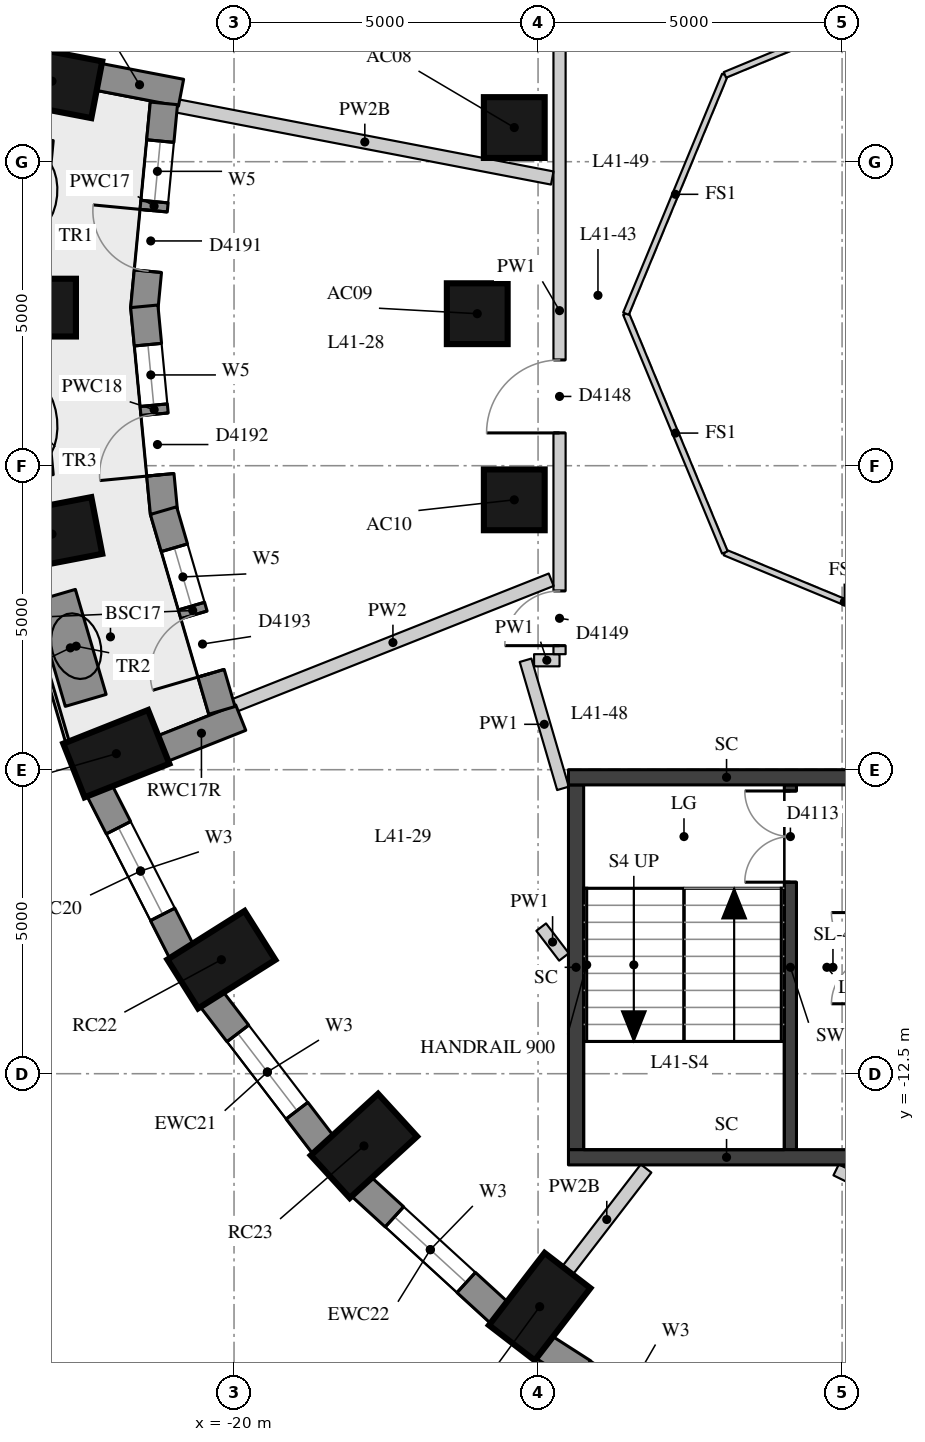
"""IFC4 building model, lengths in metres.
Left out: names, types, materials, properties, quantities, classifications, styles, units other than length and angle.
Written with IfcOpenShell. Run it as: python <this file> out.ifc"""

import sys

from ifc_helpers import new_model, si_unit, direction, frame, frame_2d, origin, origin_2d, place, context, subcontext, project, spatial, rectangle, extrude, element, fill, save


model = new_model("IFC4")
c1 = context("Model", 3, precision=1e-05, world=origin(), true_north=direction((0.0, 1.0)))
c2 = subcontext(c1, "Body", "Model", "MODEL_VIEW")
j1 = project(units=[si_unit("LENGTHUNIT", "METRE"), si_unit("PLANEANGLEUNIT", "RADIAN")], contexts=[c1])
p1 = place(None, origin())
s1 = spatial("IfcSite", under=j1, at=p1, CompositionType="ELEMENT")
p2 = place(p1, origin())
s2 = spatial("IfcBuilding", under=s1, at=p2, CompositionType="ELEMENT")
p3 = place(p2, frame((0.0, 0.0, 148.4)))
s3 = spatial("IfcBuildingStorey", under=s2, at=p3, CompositionType="ELEMENT", Elevation=148.4)
for number, where, z_axis, x_axis in (
    (1, (-22.994, 3.825, 0.0), (0.0, 0.0, 1.0), (-0.982, 0.189, 0.0)),
    (2, (-23.35, 0.1, 0.0), (0.0, 0.0, 1.0), (-1.0, 0.0, 0.0)),
    (3, (-22.994, -3.625, 0.0), (0.0, 0.0, 1.0), (-0.982, -0.189, 0.0)),
    (4, (-21.936, -7.236, 0.0), (0.0, 0.0, 1.0), (-0.93, -0.369, 0.0)),
    (5, (-20.208, -10.625, 0.0), (0.0, 0.0, 1.0), (-0.846, -0.533, 0.0)),
    (6, (-17.864, -13.688, 0.0), (0.0, 0.0, 1.0), (-0.738, -0.675, 0.0)),
    (7, (-14.973, -16.332, 0.0), (0.0, 0.0, 1.0), (-0.61, -0.792, 0.0)),
):
    element("IfcColumn", number, at=place(p3, frame(where, z_axis=z_axis, x_axis=x_axis)), inside=s3, PredefinedType="COLUMN", context=c2, shape_type="SweptSolid", body=[
        extrude(rectangle(XDim=1.5, YDim=0.95, at=origin_2d()), origin(), (0.0, 0.0, 1.0), 3.3),
    ])
for number, where, z_axis, x_axis in (
    (8, (-15.391, 3.062, 0.0), (0.0, 0.0, 1.0), (1.0, 0.0, 0.0)),
    (9, (-16.0, 0.0, 0.0), (0.0, 0.0, 1.0), (1.0, 0.0, 0.0)),
    (10, (-15.391, -3.062, 0.0), (0.0, 0.0, 1.0), (1.0, 0.0, 0.0)),
):
    element("IfcColumn", number, at=place(p3, frame(where, z_axis=z_axis, x_axis=x_axis)), inside=s3, PredefinedType="COLUMN", context=c2, shape_type="SweptSolid", body=[
        extrude(rectangle(XDim=1.0, YDim=1.0, at=origin_2d()), origin(), (0.0, 0.0, 1.0), 3.3),
    ])
p4 = place(p3, frame((-22.551, 7.191, 0.0), z_axis=(0.0, 0.0, 1.0), x_axis=(-0.281125768296, -0.959670934435, 0.0)))
e11 = element("IfcWall", 11, at=p4, inside=s3, PredefinedType="SOLIDWALL", context=c2, shape_type="SweptSolid", body=[
    extrude(rectangle(XDim=2.948, YDim=0.45, at=frame_2d((1.474, 0.0))), origin(), (0.0, 0.0, 1.0), 3.02),
])
p5 = place(p4, frame((0.674, 0.0, 0.4)))
e12 = element("IfcOpeningElement", 12, at=p5, cuts=e11, PredefinedType="OPENING", context=c2, shape_type="SweptSolid", body=[
    extrude(rectangle(XDim=1.6, YDim=1.75, at=frame_2d((0.8, 0.875))), frame((0.0, 0.235, 0.0), z_axis=(0.0, -1.0, 0.0), x_axis=(1.0, 0.0, 0.0)), (0.0, 0.0, 1.0), 0.47),
])
p6 = place(p3, frame((-22.215, -7.837, 0.0), z_axis=(0.0, 0.0, 1.0), x_axis=(0.454133999889, -0.890933392653, 0.0)))
e13 = element("IfcWall", 13, at=p6, inside=s3, PredefinedType="SOLIDWALL", context=c2, shape_type="SweptSolid", body=[
    extrude(rectangle(XDim=2.986, YDim=0.45, at=frame_2d((1.493, 0.0))), origin(), (0.0, 0.0, 1.0), 3.02),
])
p7 = place(p6, frame((0.693, 0.0, 0.4)))
e14 = element("IfcOpeningElement", 14, at=p7, cuts=e13, PredefinedType="OPENING", context=c2, shape_type="SweptSolid", body=[
    extrude(rectangle(XDim=1.6, YDim=1.75, at=frame_2d((0.8, 0.875))), frame((0.0, 0.235, 0.0), z_axis=(0.0, -1.0, 0.0), x_axis=(1.0, 0.0, 0.0)), (0.0, 0.0, 1.0), 0.47),
])
p8 = place(p3, frame((-20.374, -11.267, 0.0), z_axis=(0.0, 0.0, 1.0), x_axis=(0.607817056371, -0.794077090706, 0.0)))
e15 = element("IfcWall", 15, at=p8, inside=s3, PredefinedType="SOLIDWALL", context=c2, shape_type="SweptSolid", body=[
    extrude(rectangle(XDim=3.037, YDim=0.45, at=frame_2d((1.519, 0.0))), origin(), (0.0, 0.0, 1.0), 3.02),
])
p9 = place(p8, frame((0.719, 0.0, 0.4)))
e16 = element("IfcOpeningElement", 16, at=p9, cuts=e15, PredefinedType="OPENING", context=c2, shape_type="SweptSolid", body=[
    extrude(rectangle(XDim=1.6, YDim=1.75, at=frame_2d((0.8, 0.875))), frame((0.0, 0.235, 0.0), z_axis=(0.0, -1.0, 0.0), x_axis=(1.0, 0.0, 0.0)), (0.0, 0.0, 1.0), 0.47),
])
p10 = place(p3, frame((-17.913, -14.35, 0.0), z_axis=(0.0, 0.0, 1.0), x_axis=(0.737808755941, -0.675009807082, 0.0)))
e17 = element("IfcWall", 17, at=p10, inside=s3, PredefinedType="SOLIDWALL", context=c2, shape_type="SweptSolid", body=[
    extrude(rectangle(XDim=3.094, YDim=0.45, at=frame_2d((1.547, 0.0))), origin(), (0.0, 0.0, 1.0), 3.02),
])
p11 = place(p10, frame((0.747, 0.0, 0.4)))
e18 = element("IfcOpeningElement", 18, at=p11, cuts=e17, PredefinedType="OPENING", context=c2, shape_type="SweptSolid", body=[
    extrude(rectangle(XDim=1.6, YDim=1.75, at=frame_2d((0.8, 0.875))), frame((0.0, 0.235, 0.0), z_axis=(0.0, -1.0, 0.0), x_axis=(1.0, 0.0, 0.0)), (0.0, 0.0, 1.0), 0.47),
])
p12 = place(p3, frame((-14.908, -16.993, 0.0), z_axis=(0.0, 0.0, 1.0), x_axis=(0.842065914439, -0.539374633943, 0.0)))
e19 = element("IfcWall", 19, at=p12, inside=s3, PredefinedType="SOLIDWALL", context=c2, shape_type="SweptSolid", body=[
    extrude(rectangle(XDim=3.151, YDim=0.45, at=frame_2d((1.576, 0.0))), origin(), (0.0, 0.0, 1.0), 3.02),
])
p13 = place(p12, frame((0.776, 0.0, 0.4)))
e20 = element("IfcOpeningElement", 20, at=p13, cuts=e19, PredefinedType="OPENING", context=c2, shape_type="SweptSolid", body=[
    extrude(rectangle(XDim=1.6, YDim=1.75, at=frame_2d((0.8, 0.875))), frame((0.0, 0.235, 0.0), z_axis=(0.0, -1.0, 0.0), x_axis=(1.0, 0.0, 0.0)), (0.0, 0.0, 1.0), 0.47),
])
p14 = place(p3, frame((-22.237, 3.896, 0.0), z_axis=(0.0, 0.0, 1.0), x_axis=(0.98204526411, -0.188645432598, 0.0)))
e21 = element("IfcWall", 21, at=p14, inside=s3, PredefinedType="SOLIDWALL", context=c2, shape_type="SweptSolid", body=[
    extrude(rectangle(XDim=1.39, YDim=0.45, at=frame_2d((0.695, 0.0))), origin(), (0.0, 0.0, 1.0), 2.57),
])
p15 = place(p3, frame((-21.182, -7.156, 0.0), z_axis=(0.0, 0.0, 1.0), x_axis=(0.929514600716, 0.368785312961, 0.0)))
e22 = element("IfcWall", 22, at=p15, inside=s3, PredefinedType="SOLIDWALL", context=c2, shape_type="SweptSolid", body=[
    extrude(rectangle(XDim=1.39, YDim=0.45, at=frame_2d((0.695, 0.0))), origin(), (0.0, 0.0, 1.0), 3.02),
])
p16 = place(p3, frame((-21.154, 3.459, 0.0), z_axis=(0.0, 0.0, 1.0), x_axis=(-0.094968544931, -0.995480273774, 0.0)))
e23 = element("IfcWall", 23, at=p16, inside=s3, PredefinedType="SOLIDWALL", context=c2, shape_type="SweptSolid", body=[
    extrude(rectangle(XDim=3.396, YDim=0.45, at=frame_2d((1.698, 0.0))), origin(), (0.0, 0.0, 1.0), 3.02),
])
p17 = place(p16, frame((0.623, 0.0, 0.4)))
e24 = element("IfcOpeningElement", 24, at=p17, cuts=e23, PredefinedType="OPENING", context=c2, shape_type="SweptSolid", body=[
    extrude(rectangle(XDim=1.0, YDim=1.75, at=frame_2d((0.5, 0.875))), frame((0.0, 0.235, 0.0), z_axis=(0.0, -1.0, 0.0), x_axis=(1.0, 0.0, 0.0)), (0.0, 0.0, 1.0), 0.47),
])
p18 = place(p16, frame((1.773, 0.0, 0.0)))
e25 = element("IfcOpeningElement", 25, at=p18, cuts=e23, PredefinedType="OPENING", context=c2, shape_type="SweptSolid", body=[
    extrude(rectangle(XDim=1.0, YDim=2.15, at=frame_2d((0.5, 1.075))), frame((0.0, 0.235, 0.0), z_axis=(0.0, -1.0, 0.0), x_axis=(1.0, 0.0, 0.0)), (0.0, 0.0, 1.0), 0.47),
])
p19 = place(p3, frame((-21.476, 0.121, 0.0), z_axis=(0.0, 0.0, 1.0), x_axis=(0.094947321258, -0.995482298279, 0.0)))
e26 = element("IfcWall", 26, at=p19, inside=s3, PredefinedType="SOLIDWALL", context=c2, shape_type="SweptSolid", body=[
    extrude(rectangle(XDim=3.417, YDim=0.45, at=frame_2d((1.708, 0.0))), origin(), (0.0, 0.0, 1.0), 3.02),
])
p20 = place(p19, frame((0.634, 0.0, 0.4)))
e27 = element("IfcOpeningElement", 27, at=p20, cuts=e26, PredefinedType="OPENING", context=c2, shape_type="SweptSolid", body=[
    extrude(rectangle(XDim=1.0, YDim=1.75, at=frame_2d((0.5, 0.875))), frame((0.0, 0.235, 0.0), z_axis=(0.0, -1.0, 0.0), x_axis=(1.0, 0.0, 0.0)), (0.0, 0.0, 1.0), 0.47),
])
p21 = place(p19, frame((1.784, 0.0, 0.0)))
e28 = element("IfcOpeningElement", 28, at=p21, cuts=e26, PredefinedType="OPENING", context=c2, shape_type="SweptSolid", body=[
    extrude(rectangle(XDim=1.0, YDim=2.15, at=frame_2d((0.5, 1.075))), frame((0.0, 0.235, 0.0), z_axis=(0.0, -1.0, 0.0), x_axis=(1.0, 0.0, 0.0)), (0.0, 0.0, 1.0), 0.47),
])
p22 = place(p3, frame((-21.159, -3.239, 0.0), z_axis=(0.0, 0.0, 1.0), x_axis=(0.280377942886, -0.959889685924, 0.0)))
e29 = element("IfcWall", 29, at=p22, inside=s3, PredefinedType="SOLIDWALL", context=c2, shape_type="SweptSolid", body=[
    extrude(rectangle(XDim=3.423, YDim=0.45, at=frame_2d((1.711, 0.0))), origin(), (0.0, 0.0, 1.0), 3.02),
])
p23 = place(p22, frame((0.636, 0.0, 0.4)))
e30 = element("IfcOpeningElement", 30, at=p23, cuts=e29, PredefinedType="OPENING", context=c2, shape_type="SweptSolid", body=[
    extrude(rectangle(XDim=1.0, YDim=1.75, at=frame_2d((0.5, 0.875))), frame((0.0, 0.235, 0.0), z_axis=(0.0, -1.0, 0.0), x_axis=(1.0, 0.0, 0.0)), (0.0, 0.0, 1.0), 0.47),
])
p24 = place(p22, frame((1.786, 0.0, 0.0)))
e31 = element("IfcOpeningElement", 31, at=p24, cuts=e29, PredefinedType="OPENING", context=c2, shape_type="SweptSolid", body=[
    extrude(rectangle(XDim=1.0, YDim=2.15, at=frame_2d((0.5, 1.075))), frame((0.0, 0.235, 0.0), z_axis=(0.0, -1.0, 0.0), x_axis=(1.0, 0.0, 0.0)), (0.0, 0.0, 1.0), 0.47),
])
for number, where, z_axis, x_axis in (
    (32, (-23.322, 2.881, 0.0), (0.0, 0.0, 1.0), (-0.095, -0.995, 0.0)),
    (33, (-23.493, -0.889, 0.0), (0.0, 0.0, 1.0), (0.095, -0.995, 0.0)),
    (34, (-22.945, -4.633, 0.0), (0.0, 0.0, 1.0), (0.281, -0.96, 0.0)),
):
    element("IfcWall", number, at=place(p3, frame(where, z_axis=z_axis, x_axis=x_axis)), inside=s3, PredefinedType="USERDEFINED", context=c2, shape_type="SweptSolid", body=[
        extrude(rectangle(XDim=1.8, YDim=0.7, at=frame_2d((0.9, 0.0))), origin(), (0.0, 0.0, 1.0), 0.75),
    ])
p25 = place(p3, frame((-10.85, -13.75, 0.0), z_axis=(0.0, 0.0, 1.0), x_axis=(0.0, 1.0, 0.0)))
e35 = element("IfcWall", 35, at=p25, inside=s3, PredefinedType="SHEAR", context=c2, shape_type="SweptSolid", body=[
    extrude(rectangle(XDim=6.0, YDim=0.2, at=frame_2d((3.0, 0.0))), origin(), (0.0, 0.0, 1.0), 3.02),
])
p26 = place(p25, frame((4.4, 0.0, 0.0)))
e36 = element("IfcOpeningElement", 36, at=p26, cuts=e35, PredefinedType="OPENING", context=c2, shape_type="SweptSolid", body=[
    extrude(rectangle(XDim=1.5, YDim=2.1, at=frame_2d((0.75, 1.05))), frame((0.0, 0.11, 0.0), z_axis=(0.0, -1.0, 0.0), x_axis=(1.0, 0.0, 0.0)), (0.0, 0.0, 1.0), 0.22),
])
p27 = place(p3, frame((-14.375, -13.75, -0.28), z_axis=(0.0, 0.0, 1.0), x_axis=(0.0, 1.0, 0.0)))
e37 = element("IfcWall", 37, at=p27, inside=s3, PredefinedType="SHEAR", context=c2, shape_type="SweptSolid", body=[
    extrude(rectangle(XDim=6.0, YDim=0.25, at=frame_2d((3.0, 0.0))), origin(), (0.0, 0.0, 1.0), 3.3),
])
for number, where, z_axis, x_axis in (
    (38, (-14.5, -7.625, -0.28), (0.0, 0.0, 1.0), (1.0, 0.0, 0.0)),
    (39, (-14.5, -13.875, -0.28), (0.0, 0.0, 1.0), (1.0, 0.0, 0.0)),
):
    element("IfcWall", number, at=place(p3, frame(where, z_axis=z_axis, x_axis=x_axis)), inside=s3, PredefinedType="SHEAR", context=c2, shape_type="SweptSolid", body=[
        extrude(rectangle(XDim=5.2, YDim=0.25, at=frame_2d((2.6, 0.0))), origin(), (0.0, 0.0, 1.0), 3.3),
    ])
p28 = place(p3, frame((-7.844, -15.185, 0.0), z_axis=(0.0, 0.0, 1.0), x_axis=(-0.898266579534, 0.439450966653, 0.0)))
e40 = element("IfcWall", 40, at=p28, inside=s3, PredefinedType="PARTITIONING", context=c2, shape_type="SweptSolid", body=[
    extrude(rectangle(XDim=2.509, YDim=0.2, at=frame_2d((1.254, 0.0))), origin(), (0.0, 0.0, 1.0), 3.02),
])
p29 = place(p3, frame((-14.574, -10.58, 0.0), z_axis=(0.0, 0.0, 1.0), x_axis=(-0.606745625174, 0.794896060081, 0.0)))
e41 = element("IfcWall", 41, at=p29, inside=s3, PredefinedType="PARTITIONING", context=c2, shape_type="SweptSolid", body=[
    extrude(rectangle(XDim=0.618, YDim=0.2, at=frame_2d((0.309, 0.0))), origin(), (0.0, 0.0, 1.0), 3.02),
])
p30 = place(p3, frame((-14.59, -7.807, 0.0), z_axis=(0.0, 0.0, 1.0), x_axis=(-0.280401457903, 0.959882817018, 0.0)))
e42 = element("IfcWall", 42, at=p30, inside=s3, PredefinedType="PARTITIONING", context=c2, shape_type="SweptSolid", body=[
    extrude(rectangle(XDim=2.195, YDim=0.2, at=frame_2d((1.098, 0.0))), origin(), (0.0, 0.0, 1.0), 3.02),
])
p31 = place(p3, frame((-15.065, -5.7, 0.0), z_axis=(0.0, 0.0, 1.0), x_axis=(1.0, 0.0, 0.0)))
e43 = element("IfcWall", 43, at=p31, inside=s3, PredefinedType="PARTITIONING", context=c2, shape_type="SweptSolid", body=[
    extrude(rectangle(XDim=0.419, YDim=0.2, at=frame_2d((0.209, 0.0))), origin(), (0.0, 0.0, 1.0), 3.02),
])
p32 = place(p3, frame((-14.647, -5.6, 0.0), z_axis=(0.0, 0.0, 1.0), x_axis=(0.0, 1.0, 0.0)))
e44 = element("IfcWall", 44, at=p32, inside=s3, PredefinedType="PARTITIONING", context=c2, shape_type="SweptSolid", body=[
    extrude(rectangle(XDim=11.3, YDim=0.2, at=frame_2d((5.65, 0.0))), origin(), (0.0, 0.0, 1.0), 3.02),
])
p33 = place(p32, frame((10.06, 0.0, 0.0)))
e45 = element("IfcOpeningElement", 45, at=p33, cuts=e44, PredefinedType="OPENING", context=c2, shape_type="SweptSolid", body=[
    extrude(rectangle(XDim=1.1, YDim=2.1, at=frame_2d((0.55, 1.05))), frame((0.0, 0.11, 0.0), z_axis=(0.0, -1.0, 0.0), x_axis=(1.0, 0.0, 0.0)), (0.0, 0.0, 1.0), 0.22),
])
p34 = place(p32, frame((3.639, 0.0, 0.0)))
e46 = element("IfcOpeningElement", 46, at=p34, cuts=e44, PredefinedType="OPENING", context=c2, shape_type="SweptSolid", body=[
    extrude(rectangle(XDim=1.2, YDim=2.1, at=frame_2d((0.6, 1.05))), frame((0.0, 0.11, 0.0), z_axis=(0.0, -1.0, 0.0), x_axis=(1.0, 0.0, 0.0)), (0.0, 0.0, 1.0), 0.22),
])
p35 = place(p32, frame((0.14, 0.0, 0.0)))
e47 = element("IfcOpeningElement", 47, at=p35, cuts=e44, PredefinedType="OPENING", context=c2, shape_type="SweptSolid", body=[
    extrude(rectangle(XDim=0.9, YDim=2.1, at=frame_2d((0.45, 1.05))), frame((0.0, 0.11, 0.0), z_axis=(0.0, -1.0, 0.0), x_axis=(1.0, 0.0, 0.0)), (0.0, 0.0, 1.0), 0.22),
])
p36 = place(p3, frame((-20.932, 3.417, 0.0), z_axis=(0.0, 0.0, 1.0), x_axis=(0.982023362662, -0.188759410856, 0.0)))
e48 = element("IfcWall", 48, at=p36, inside=s3, PredefinedType="PARTITIONING", context=c2, shape_type="SweptSolid", body=[
    extrude(rectangle(XDim=6.278, YDim=0.22, at=frame_2d((3.139, 0.0))), origin(), (0.0, 0.0, 1.0), 2.57),
])
p37 = place(p3, frame((-19.99, -6.441, 0.0), z_axis=(0.0, 0.0, 1.0), x_axis=(0.929507316491, 0.368803672147, 0.0)))
e49 = element("IfcWall", 49, at=p37, inside=s3, PredefinedType="PARTITIONING", context=c2, shape_type="SweptSolid", body=[
    extrude(rectangle(XDim=5.6, YDim=0.22, at=frame_2d((2.8, 0.0))), origin(), (0.0, 0.0, 1.0), 3.02),
])
p38 = place(p3, frame((-14.516, -15.737, 0.0), z_axis=(0.0, 0.0, 1.0), x_axis=(0.609983624648, 0.792414019097, 0.0)))
e50 = element("IfcWall", 50, at=p38, inside=s3, PredefinedType="PARTITIONING", context=c2, shape_type="SweptSolid", body=[
    extrude(rectangle(XDim=2.118, YDim=0.22, at=frame_2d((1.059, 0.0))), origin(), (0.0, 0.0, 1.0), 2.57),
])
for number, where, z_axis, x_axis in (
    (51, (-8.0, -5.554, 0.0), (0.0, 0.0, 1.0), (-0.924, 0.383, 0.0)),
    (52, (-11.927, -3.927, 0.0), (0.0, 0.0, 1.0), (-0.383, 0.924, 0.0)),
    (53, (-13.554, 0.0, 0.0), (0.0, 0.0, 1.0), (0.383, 0.924, 0.0)),
    (54, (-11.927, 3.927, 0.0), (0.0, 0.0, 1.0), (0.924, 0.383, 0.0)),
):
    element("IfcWall", number, at=place(p3, frame(where, z_axis=z_axis, x_axis=x_axis)), inside=s3, PredefinedType="PARTITIONING", context=c2, shape_type="SweptSolid", body=[
        extrude(rectangle(XDim=4.251, YDim=0.1, at=frame_2d((2.125, 0.0))), origin(), (0.0, 0.0, 1.0), 3.02),
    ])
p39 = place(p7, origin())
e55 = element("IfcWindow", 55, at=p39, inside=s3, PartitioningType="SINGLE_PANEL", PredefinedType="WINDOW", context=c2, shape_type="SweptSolid", body=[
    extrude(rectangle(XDim=1.6, YDim=1.75, at=frame_2d((0.8, 0.875))), frame((0.0, 0.035, 0.0), z_axis=(0.0, -1.0, 0.0), x_axis=(1.0, 0.0, 0.0)), (0.0, 0.0, 1.0), 0.06),
])
fill(e14, e55)
p40 = place(p9, origin())
e56 = element("IfcWindow", 56, at=p40, inside=s3, PartitioningType="SINGLE_PANEL", PredefinedType="WINDOW", context=c2, shape_type="SweptSolid", body=[
    extrude(rectangle(XDim=1.6, YDim=1.75, at=frame_2d((0.8, 0.875))), frame((0.0, 0.035, 0.0), z_axis=(0.0, -1.0, 0.0), x_axis=(1.0, 0.0, 0.0)), (0.0, 0.0, 1.0), 0.06),
])
fill(e16, e56)
p41 = place(p11, origin())
e57 = element("IfcWindow", 57, at=p41, inside=s3, PartitioningType="SINGLE_PANEL", PredefinedType="WINDOW", context=c2, shape_type="SweptSolid", body=[
    extrude(rectangle(XDim=1.6, YDim=1.75, at=frame_2d((0.8, 0.875))), frame((0.0, 0.035, 0.0), z_axis=(0.0, -1.0, 0.0), x_axis=(1.0, 0.0, 0.0)), (0.0, 0.0, 1.0), 0.06),
])
fill(e18, e57)
p42 = place(p17, origin())
e58 = element("IfcWindow", 58, at=p42, inside=s3, PartitioningType="SINGLE_PANEL", PredefinedType="WINDOW", context=c2, shape_type="SweptSolid", body=[
    extrude(rectangle(XDim=1.0, YDim=1.75, at=frame_2d((0.5, 0.875))), frame((0.0, 0.035, 0.0), z_axis=(0.0, -1.0, 0.0), x_axis=(1.0, 0.0, 0.0)), (0.0, 0.0, 1.0), 0.06),
])
fill(e24, e58)
p43 = place(p18, frame((1.0, 0.0, 0.0), z_axis=(0.0, 0.0, 1.0), x_axis=(-1.0, 0.0, 0.0)))
e59 = element("IfcDoor", 59, at=p43, inside=s3, OperationType="SINGLE_SWING_RIGHT", PredefinedType="DOOR", context=c2, shape_type="SweptSolid", body=[
    extrude(rectangle(XDim=1.0, YDim=2.15, at=frame_2d((0.5, 1.075))), frame((0.0, 0.075, 0.0), z_axis=(0.0, -1.0, 0.0), x_axis=(1.0, 0.0, 0.0)), (0.0, 0.0, 1.0), 0.05),
])
fill(e25, e59)
p44 = place(p20, origin())
e60 = element("IfcWindow", 60, at=p44, inside=s3, PartitioningType="SINGLE_PANEL", PredefinedType="WINDOW", context=c2, shape_type="SweptSolid", body=[
    extrude(rectangle(XDim=1.0, YDim=1.75, at=frame_2d((0.5, 0.875))), frame((0.0, 0.035, 0.0), z_axis=(0.0, -1.0, 0.0), x_axis=(1.0, 0.0, 0.0)), (0.0, 0.0, 1.0), 0.06),
])
fill(e27, e60)
p45 = place(p21, frame((1.0, 0.0, 0.0), z_axis=(0.0, 0.0, 1.0), x_axis=(-1.0, 0.0, 0.0)))
e61 = element("IfcDoor", 61, at=p45, inside=s3, OperationType="SINGLE_SWING_LEFT", PredefinedType="DOOR", context=c2, shape_type="SweptSolid", body=[
    extrude(rectangle(XDim=1.0, YDim=2.15, at=frame_2d((0.5, 1.075))), frame((0.0, 0.075, 0.0), z_axis=(0.0, -1.0, 0.0), x_axis=(1.0, 0.0, 0.0)), (0.0, 0.0, 1.0), 0.05),
])
fill(e28, e61)
p46 = place(p23, origin())
e62 = element("IfcWindow", 62, at=p46, inside=s3, PartitioningType="SINGLE_PANEL", PredefinedType="WINDOW", context=c2, shape_type="SweptSolid", body=[
    extrude(rectangle(XDim=1.0, YDim=1.75, at=frame_2d((0.5, 0.875))), frame((0.0, 0.035, 0.0), z_axis=(0.0, -1.0, 0.0), x_axis=(1.0, 0.0, 0.0)), (0.0, 0.0, 1.0), 0.06),
])
fill(e30, e62)
p47 = place(p24, frame((1.0, 0.0, 0.0), z_axis=(0.0, 0.0, 1.0), x_axis=(-1.0, 0.0, 0.0)))
e63 = element("IfcDoor", 63, at=p47, inside=s3, OperationType="SINGLE_SWING_LEFT", PredefinedType="DOOR", context=c2, shape_type="SweptSolid", body=[
    extrude(rectangle(XDim=1.0, YDim=2.15, at=frame_2d((0.5, 1.075))), frame((0.0, 0.075, 0.0), z_axis=(0.0, -1.0, 0.0), x_axis=(1.0, 0.0, 0.0)), (0.0, 0.0, 1.0), 0.05),
])
fill(e31, e63)
p48 = place(p26, origin())
e64 = element("IfcDoor", 64, at=p48, inside=s3, OperationType="DOUBLE_DOOR_SINGLE_SWING", PredefinedType="DOOR", context=c2, shape_type="SweptSolid", body=[
    extrude(rectangle(XDim=1.5, YDim=2.1, at=frame_2d((0.75, 1.05))), frame((0.0, 0.025, 0.0), z_axis=(0.0, -1.0, 0.0), x_axis=(1.0, 0.0, 0.0)), (0.0, 0.0, 1.0), 0.05),
])
fill(e36, e64)
p49 = place(p34, origin())
e65 = element("IfcDoor", 65, at=p49, inside=s3, OperationType="SINGLE_SWING_LEFT", PredefinedType="DOOR", context=c2, shape_type="SweptSolid", body=[
    extrude(rectangle(XDim=1.2, YDim=2.1, at=frame_2d((0.6, 1.05))), frame((0.0, 0.025, 0.0), z_axis=(0.0, -1.0, 0.0), x_axis=(1.0, 0.0, 0.0)), (0.0, 0.0, 1.0), 0.05),
])
fill(e46, e65)
p50 = place(p35, origin())
e66 = element("IfcDoor", 66, at=p50, inside=s3, OperationType="SINGLE_SWING_LEFT", PredefinedType="DOOR", context=c2, shape_type="SweptSolid", body=[
    extrude(rectangle(XDim=0.9, YDim=2.1, at=frame_2d((0.45, 1.05))), frame((0.0, 0.025, 0.0), z_axis=(0.0, -1.0, 0.0), x_axis=(1.0, 0.0, 0.0)), (0.0, 0.0, 1.0), 0.05),
])
fill(e47, e66)
save(model, sys.argv[1])
